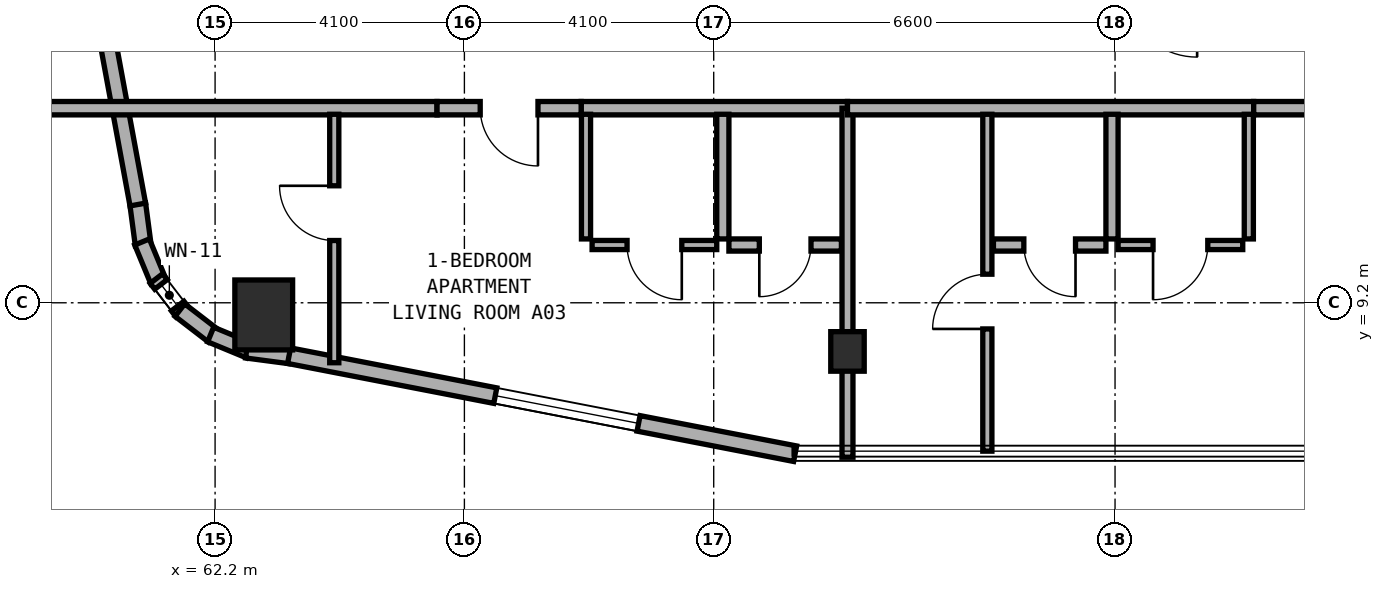
"""IFC4 building model, lengths in metres.
Left out: names, types, materials, properties, quantities, classifications, styles, units other than length and angle.
Written with IfcOpenShell. Run it as: python <this file> out.ifc"""

import sys

from ifc_helpers import new_model, si_unit, direction, frame, frame_2d, origin, origin_2d, place, context, subcontext, project, spatial, rectangle, extrude, element, fill, save


model = new_model("IFC4")
c1 = context("Model", 3, precision=1e-05, world=origin(), true_north=direction((0.0, 1.0)))
c2 = subcontext(c1, "Body", "Model", "MODEL_VIEW")
j1 = project(units=[si_unit("LENGTHUNIT", "METRE"), si_unit("PLANEANGLEUNIT", "RADIAN")], contexts=[c1])
p1 = place(None, origin())
s1 = spatial("IfcSite", under=j1, at=p1, CompositionType="ELEMENT")
p2 = place(p1, origin())
s2 = spatial("IfcBuilding", under=s1, at=p2, CompositionType="ELEMENT")
p3 = place(p2, frame((0.0, 0.0, 116.0)))
s3 = spatial("IfcBuildingStorey", under=s2, at=p3, CompositionType="ELEMENT", Elevation=116.0)
p4 = place(p3, frame((72.6, 8.4, 0.0), z_axis=(0.0, 0.0, 1.0), x_axis=(1.0, 0.0, 0.0)))
e1 = element("IfcColumn", 1, at=p4, inside=s3, PredefinedType="COLUMN", context=c2, shape_type="SweptSolid", body=[
    extrude(rectangle(XDim=0.55, YDim=0.65, at=origin_2d()), origin(), (0.0, 0.0, 1.0), 3.5),
])
p5 = place(p3, frame((63.0, 9.0, 0.0), z_axis=(0.0, 0.0, 1.0), x_axis=(1.0, 0.0, 0.0)))
e2 = element("IfcColumn", 2, at=p5, inside=s3, PredefinedType="COLUMN", context=c2, shape_type="SweptSolid", body=[
    extrude(rectangle(XDim=0.95, YDim=1.15, at=origin_2d()), origin(), (0.0, 0.0, 1.0), 3.5),
])
p6 = place(p3, frame((60.928, 10.825, 0.0), z_axis=(0.0, 0.0, 1.0), x_axis=(0.131667498923, -0.991293937098, 0.0)))
e3 = element("IfcWall", 3, at=p6, inside=s3, PredefinedType="STANDARD", context=c2, shape_type="SweptSolid", body=[
    extrude(rectangle(XDim=0.677, YDim=0.26, at=frame_2d((0.338, 0.0))), origin(), (0.0, 0.0, 1.0), 3.18),
])
p7 = place(p3, frame((60.999, 10.2, 0.0), z_axis=(0.0, 0.0, 1.0), x_axis=(0.381988976935, -0.924166879681, 0.0)))
e4 = element("IfcWall", 4, at=p7, inside=s3, PredefinedType="STANDARD", context=c2, shape_type="SweptSolid", body=[
    extrude(rectangle(XDim=0.693, YDim=0.26, at=frame_2d((0.347, 0.0))), origin(), (0.0, 0.0, 1.0), 3.18),
])
p8 = place(p3, frame((61.236, 9.599, 0.0), z_axis=(0.0, 0.0, 1.0), x_axis=(0.609472651958, -0.792807092876, 0.0)))
e5 = element("IfcWall", 5, at=p8, inside=s3, PredefinedType="STANDARD", context=c2, shape_type="SweptSolid", body=[
    extrude(rectangle(XDim=0.694, YDim=0.26, at=frame_2d((0.347, 0.0))), origin(), (0.0, 0.0, 1.0), 3.18),
])
p9 = place(p8, frame((0.122, 0.0, 0.85)))
e6 = element("IfcOpeningElement", 6, at=p9, cuts=e5, PredefinedType="OPENING", context=c2, shape_type="SweptSolid", body=[
    extrude(rectangle(XDim=0.45, YDim=1.5, at=frame_2d((0.225, 0.75))), frame((0.0, 0.14, 0.0), z_axis=(0.0, -1.0, 0.0), x_axis=(1.0, 0.0, 0.0)), (0.0, 0.0, 1.0), 0.28),
])
p10 = place(p3, frame((61.621, 9.08, 0.0), z_axis=(0.0, 0.0, 1.0), x_axis=(0.792506234191, -0.609863811657, 0.0)))
e7 = element("IfcWall", 7, at=p10, inside=s3, PredefinedType="STANDARD", context=c2, shape_type="SweptSolid", body=[
    extrude(rectangle(XDim=0.694, YDim=0.26, at=frame_2d((0.347, 0.0))), origin(), (0.0, 0.0, 1.0), 3.18),
])
p11 = place(p3, frame((62.127, 8.678, 0.0), z_axis=(0.0, 0.0, 1.0), x_axis=(0.92421822618, -0.381864727877, 0.0)))
e8 = element("IfcWall", 8, at=p11, inside=s3, PredefinedType="STANDARD", context=c2, shape_type="SweptSolid", body=[
    extrude(rectangle(XDim=0.694, YDim=0.26, at=frame_2d((0.347, 0.0))), origin(), (0.0, 0.0, 1.0), 3.18),
])
p12 = place(p3, frame((62.719, 8.421, 0.0), z_axis=(0.0, 0.0, 1.0), x_axis=(0.991433279471, -0.130614135366, 0.0)))
e9 = element("IfcWall", 9, at=p12, inside=s3, PredefinedType="STANDARD", context=c2, shape_type="SweptSolid", body=[
    extrude(rectangle(XDim=0.712, YDim=0.26, at=frame_2d((0.356, 0.0))), origin(), (0.0, 0.0, 1.0), 3.18),
])
p13 = place(p3, frame((63.417, 8.33, 0.0), z_axis=(0.0, 0.0, 1.0), x_axis=(0.981750199588, -0.190175039396, 0.0)))
e10 = element("IfcWall", 10, at=p13, inside=s3, PredefinedType="STANDARD", context=c2, shape_type="SweptSolid", body=[
    extrude(rectangle(XDim=8.477, YDim=0.26, at=frame_2d((4.238, 0.0))), origin(), (0.0, 0.0, 1.0), 3.18),
])
p14 = place(p13, frame((3.454, 0.0, 0.8)))
e11 = element("IfcOpeningElement", 11, at=p14, cuts=e10, PredefinedType="OPENING", context=c2, shape_type="SweptSolid", body=[
    extrude(rectangle(XDim=2.4, YDim=1.6, at=frame_2d((1.2, 0.8))), frame((0.0, 0.14, 0.0), z_axis=(0.0, -1.0, 0.0), x_axis=(1.0, 0.0, 0.0)), (0.0, 0.0, 1.0), 0.28),
])
p15 = place(p3, frame((59.318, 19.558, 0.0), z_axis=(0.0, 0.0, 1.0), x_axis=(0.181209963057, -0.983444431215, 0.0)))
e12 = element("IfcWall", 12, at=p15, inside=s3, PredefinedType="STANDARD", context=c2, shape_type="SweptSolid", body=[
    extrude(rectangle(XDim=8.889, YDim=0.26, at=frame_2d((4.445, 0.0))), origin(), (0.0, 0.0, 1.0), 3.18),
])
p16 = place(p15, frame((1.444, 0.0, 0.8)))
e13 = element("IfcOpeningElement", 13, at=p16, cuts=e12, PredefinedType="OPENING", context=c2, shape_type="SweptSolid", body=[
    extrude(rectangle(XDim=2.4, YDim=1.6, at=frame_2d((1.2, 0.8))), frame((0.0, 0.14, 0.0), z_axis=(0.0, -1.0, 0.0), x_axis=(1.0, 0.0, 0.0)), (0.0, 0.0, 1.0), 0.28),
])
p17 = place(p3, frame((59.36, 12.4, 0.0), z_axis=(0.0, 0.0, 1.0), x_axis=(1.0, 0.0, 0.0)))
e14 = element("IfcWall", 14, at=p17, inside=s3, PredefinedType="SOLIDWALL", context=c2, shape_type="SweptSolid", body=[
    extrude(rectangle(XDim=6.49, YDim=0.22, at=frame_2d((3.245, 0.0))), origin(), (0.0, 0.0, 1.0), 2.875),
])
p18 = place(p3, frame((68.22, 12.4, 0.0), z_axis=(0.0, 0.0, 1.0), x_axis=(1.0, 0.0, 0.0)))
e15 = element("IfcWall", 15, at=p18, inside=s3, PredefinedType="SOLIDWALL", context=c2, shape_type="SweptSolid", body=[
    extrude(rectangle(XDim=4.38, YDim=0.22, at=frame_2d((2.19, 0.0))), origin(), (0.0, 0.0, 1.0), 2.755),
])
p19 = place(p3, frame((65.85, 12.4, 0.0), z_axis=(0.0, 0.0, 1.0), x_axis=(1.0, 0.0, 0.0)))
e16 = element("IfcWall", 16, at=p19, inside=s3, PredefinedType="SOLIDWALL", context=c2, shape_type="SweptSolid", body=[
    extrude(rectangle(XDim=2.37, YDim=0.22, at=frame_2d((1.185, 0.0))), origin(), (0.0, 0.0, 1.0), 3.18),
])
p20 = place(p19, frame((0.71, 0.0, 0.0)))
e17 = element("IfcOpeningElement", 17, at=p20, cuts=e16, PredefinedType="OPENING", context=c2, shape_type="SweptSolid", body=[
    extrude(rectangle(XDim=0.95, YDim=2.1, at=frame_2d((0.475, 1.05))), frame((0.0, 0.12, 0.0), z_axis=(0.0, -1.0, 0.0), x_axis=(1.0, 0.0, 0.0)), (0.0, 0.0, 1.0), 0.24),
])
p21 = place(p3, frame((64.16, 8.214, 0.0), z_axis=(0.0, 0.0, 1.0), x_axis=(0.0, 1.0, 0.0)))
e18 = element("IfcWall", 18, at=p21, inside=s3, PredefinedType="PARTITIONING", context=c2, shape_type="SweptSolid", body=[
    extrude(rectangle(XDim=4.086, YDim=0.15, at=frame_2d((2.043, 0.0))), origin(), (0.0, 0.0, 1.0), 2.875),
])
p22 = place(p21, frame((2.01, 0.0, 0.0)))
e19 = element("IfcOpeningElement", 19, at=p22, cuts=e18, PredefinedType="OPENING", context=c2, shape_type="SweptSolid", body=[
    extrude(rectangle(XDim=0.9, YDim=2.1, at=frame_2d((0.45, 1.05))), frame((0.0, 0.085, 0.0), z_axis=(0.0, -1.0, 0.0), x_axis=(1.0, 0.0, 0.0)), (0.0, 0.0, 1.0), 0.17),
])
p23 = place(p3, frame((70.55, 10.25, 0.0), z_axis=(0.0, 0.0, 1.0), x_axis=(0.0, 1.0, 0.0)))
e20 = element("IfcWall", 20, at=p23, inside=s3, PredefinedType="PLUMBINGWALL", context=c2, shape_type="SweptSolid", body=[
    extrude(rectangle(XDim=2.05, YDim=0.2, at=frame_2d((1.025, 0.0))), origin(), (0.0, 0.0, 1.0), 3.18),
])
p24 = place(p3, frame((68.3, 10.25, 0.0), z_axis=(0.0, 0.0, 1.0), x_axis=(0.0, 1.0, 0.0)))
e21 = element("IfcWall", 21, at=p24, inside=s3, PredefinedType="PARTITIONING", context=c2, shape_type="SweptSolid", body=[
    extrude(rectangle(XDim=2.05, YDim=0.15, at=frame_2d((1.025, 0.0))), origin(), (0.0, 0.0, 1.0), 3.18),
])
p25 = place(p3, frame((70.65, 10.15, 0.0), z_axis=(0.0, 0.0, 1.0), x_axis=(1.0, 0.0, 0.0)))
e22 = element("IfcWall", 22, at=p25, inside=s3, PredefinedType="PLUMBINGWALL", context=c2, shape_type="SweptSolid", body=[
    extrude(rectangle(XDim=1.85, YDim=0.2, at=frame_2d((0.925, 0.0))), origin(), (0.0, 0.0, 1.0), 3.18),
])
p26 = place(p25, frame((0.5, 0.0, 0.0)))
e23 = element("IfcOpeningElement", 23, at=p26, cuts=e22, PredefinedType="OPENING", context=c2, shape_type="SweptSolid", body=[
    extrude(rectangle(XDim=0.85, YDim=2.1, at=frame_2d((0.425, 1.05))), frame((0.0, 0.11, 0.0), z_axis=(0.0, -1.0, 0.0), x_axis=(1.0, 0.0, 0.0)), (0.0, 0.0, 1.0), 0.22),
])
p27 = place(p3, frame((68.4, 10.15, 0.0), z_axis=(0.0, 0.0, 1.0), x_axis=(1.0, 0.0, 0.0)))
e24 = element("IfcWall", 24, at=p27, inside=s3, PredefinedType="PARTITIONING", context=c2, shape_type="SweptSolid", body=[
    extrude(rectangle(XDim=2.05, YDim=0.15, at=frame_2d((1.025, 0.0))), origin(), (0.0, 0.0, 1.0), 3.18),
])
p28 = place(p27, frame((0.575, 0.0, 0.0)))
e25 = element("IfcOpeningElement", 25, at=p28, cuts=e24, PredefinedType="OPENING", context=c2, shape_type="SweptSolid", body=[
    extrude(rectangle(XDim=0.9, YDim=2.1, at=frame_2d((0.45, 1.05))), frame((0.0, 0.085, 0.0), z_axis=(0.0, -1.0, 0.0), x_axis=(1.0, 0.0, 0.0)), (0.0, 0.0, 1.0), 0.17),
])
p29 = place(p3, frame((72.6, 6.66, 0.0), z_axis=(0.0, 0.0, 1.0), x_axis=(0.0, 1.0, 0.0)))
e26 = element("IfcWall", 26, at=p29, inside=s3, PredefinedType="SOLIDWALL", context=c2, shape_type="SweptSolid", body=[
    extrude(rectangle(XDim=5.74, YDim=0.18, at=frame_2d((2.87, 0.0))), origin(), (0.0, 0.0, 1.0), 2.755),
])
p30 = place(p3, frame((72.6, 12.4, 0.0), z_axis=(0.0, 0.0, 1.0), x_axis=(1.0, 0.0, 0.0)))
e27 = element("IfcWall", 27, at=p30, inside=s3, PredefinedType="SOLIDWALL", context=c2, shape_type="SweptSolid", body=[
    extrude(rectangle(XDim=6.68, YDim=0.22, at=frame_2d((3.34, 0.0))), origin(), (0.0, 0.0, 1.0), 2.755),
])
p31 = place(p3, frame((79.28, 12.4, 0.0), z_axis=(0.0, 0.0, 1.0), x_axis=(1.0, 0.0, 0.0)))
e28 = element("IfcWall", 28, at=p31, inside=s3, PredefinedType="SOLIDWALL", context=c2, shape_type="SweptSolid", body=[
    extrude(rectangle(XDim=9.07, YDim=0.22, at=frame_2d((4.535, 0.0))), origin(), (0.0, 0.0, 1.0), 2.755),
])
p32 = place(p31, frame((4.06, 0.0, 0.0)))
e29 = element("IfcOpeningElement", 29, at=p32, cuts=e28, PredefinedType="OPENING", context=c2, shape_type="SweptSolid", body=[
    extrude(rectangle(XDim=0.95, YDim=2.1, at=frame_2d((0.475, 1.05))), frame((0.0, 0.12, 0.0), z_axis=(0.0, -1.0, 0.0), x_axis=(1.0, 0.0, 0.0)), (0.0, 0.0, 1.0), 0.24),
])
p33 = place(p3, frame((74.9, 6.76, 0.0), z_axis=(0.0, 0.0, 1.0), x_axis=(0.0, 1.0, 0.0)))
e30 = element("IfcWall", 30, at=p33, inside=s3, PredefinedType="PARTITIONING", context=c2, shape_type="SweptSolid", body=[
    extrude(rectangle(XDim=5.54, YDim=0.15, at=frame_2d((2.77, 0.0))), origin(), (0.0, 0.0, 1.0), 2.855),
])
p34 = place(p33, frame((2.01, 0.0, 0.0)))
e31 = element("IfcOpeningElement", 31, at=p34, cuts=e30, PredefinedType="OPENING", context=c2, shape_type="SweptSolid", body=[
    extrude(rectangle(XDim=0.9, YDim=2.1, at=frame_2d((0.45, 1.05))), frame((0.0, 0.085, 0.0), z_axis=(0.0, -1.0, 0.0), x_axis=(1.0, 0.0, 0.0)), (0.0, 0.0, 1.0), 0.17),
])
p35 = place(p3, frame((76.95, 10.25, 0.0), z_axis=(0.0, 0.0, 1.0), x_axis=(0.0, 1.0, 0.0)))
e32 = element("IfcWall", 32, at=p35, inside=s3, PredefinedType="PLUMBINGWALL", context=c2, shape_type="SweptSolid", body=[
    extrude(rectangle(XDim=2.05, YDim=0.2, at=frame_2d((1.025, 0.0))), origin(), (0.0, 0.0, 1.0), 2.855),
])
p36 = place(p3, frame((79.2, 10.25, 0.0), z_axis=(0.0, 0.0, 1.0), x_axis=(0.0, 1.0, 0.0)))
e33 = element("IfcWall", 33, at=p36, inside=s3, PredefinedType="PARTITIONING", context=c2, shape_type="SweptSolid", body=[
    extrude(rectangle(XDim=2.05, YDim=0.15, at=frame_2d((1.025, 0.0))), origin(), (0.0, 0.0, 1.0), 2.855),
])
p37 = place(p3, frame((75.0, 10.15, 0.0), z_axis=(0.0, 0.0, 1.0), x_axis=(1.0, 0.0, 0.0)))
e34 = element("IfcWall", 34, at=p37, inside=s3, PredefinedType="PLUMBINGWALL", context=c2, shape_type="SweptSolid", body=[
    extrude(rectangle(XDim=1.85, YDim=0.2, at=frame_2d((0.925, 0.0))), origin(), (0.0, 0.0, 1.0), 3.18),
])
p38 = place(p37, frame((0.5, 0.0, 0.0)))
e35 = element("IfcOpeningElement", 35, at=p38, cuts=e34, PredefinedType="OPENING", context=c2, shape_type="SweptSolid", body=[
    extrude(rectangle(XDim=0.85, YDim=2.1, at=frame_2d((0.425, 1.05))), frame((0.0, 0.11, 0.0), z_axis=(0.0, -1.0, 0.0), x_axis=(1.0, 0.0, 0.0)), (0.0, 0.0, 1.0), 0.22),
])
p39 = place(p3, frame((77.05, 10.15, 0.0), z_axis=(0.0, 0.0, 1.0), x_axis=(1.0, 0.0, 0.0)))
e36 = element("IfcWall", 36, at=p39, inside=s3, PredefinedType="PARTITIONING", context=c2, shape_type="SweptSolid", body=[
    extrude(rectangle(XDim=2.05, YDim=0.15, at=frame_2d((1.025, 0.0))), origin(), (0.0, 0.0, 1.0), 3.18),
])
p40 = place(p39, frame((0.575, 0.0, 0.0)))
e37 = element("IfcOpeningElement", 37, at=p40, cuts=e36, PredefinedType="OPENING", context=c2, shape_type="SweptSolid", body=[
    extrude(rectangle(XDim=0.9, YDim=2.1, at=frame_2d((0.45, 1.05))), frame((0.0, 0.085, 0.0), z_axis=(0.0, -1.0, 0.0), x_axis=(1.0, 0.0, 0.0)), (0.0, 0.0, 1.0), 0.17),
])
p41 = place(p14, origin())
e38 = element("IfcWindow", 38, at=p41, inside=s3, PartitioningType="SINGLE_PANEL", PredefinedType="WINDOW", context=c2, shape_type="SweptSolid", body=[
    extrude(rectangle(XDim=2.4, YDim=1.6, at=frame_2d((1.2, 0.8))), frame((0.0, 0.03, 0.0), z_axis=(0.0, -1.0, 0.0), x_axis=(1.0, 0.0, 0.0)), (0.0, 0.0, 1.0), 0.06),
])
fill(e11, e38)
p42 = place(p9, origin())
e39 = element("IfcWindow", 39, at=p42, inside=s3, PartitioningType="SINGLE_PANEL", PredefinedType="WINDOW", context=c2, shape_type="SweptSolid", body=[
    extrude(rectangle(XDim=0.45, YDim=1.5, at=frame_2d((0.225, 0.75))), frame((0.0, 0.03, 0.0), z_axis=(0.0, -1.0, 0.0), x_axis=(1.0, 0.0, 0.0)), (0.0, 0.0, 1.0), 0.06),
])
fill(e6, e39)
p43 = place(p20, frame((0.95, 0.0, 0.0), z_axis=(0.0, 0.0, 1.0), x_axis=(-1.0, 0.0, 0.0)))
e40 = element("IfcDoor", 40, at=p43, inside=s3, OperationType="SINGLE_SWING_LEFT", PredefinedType="DOOR", context=c2, shape_type="SweptSolid", body=[
    extrude(rectangle(XDim=0.95, YDim=2.1, at=frame_2d((0.475, 1.05))), frame((0.0, 0.025, 0.0), z_axis=(0.0, -1.0, 0.0), x_axis=(1.0, 0.0, 0.0)), (0.0, 0.0, 1.0), 0.05),
])
fill(e17, e40)
p44 = place(p22, origin())
e41 = element("IfcDoor", 41, at=p44, inside=s3, OperationType="SINGLE_SWING_RIGHT", PredefinedType="DOOR", context=c2, shape_type="SweptSolid", body=[
    extrude(rectangle(XDim=0.9, YDim=2.1, at=frame_2d((0.45, 1.05))), frame((0.0, 0.025, 0.0), z_axis=(0.0, -1.0, 0.0), x_axis=(1.0, 0.0, 0.0)), (0.0, 0.0, 1.0), 0.05),
])
fill(e19, e41)
p45 = place(p26, frame((0.85, 0.0, 0.0), z_axis=(0.0, 0.0, 1.0), x_axis=(-1.0, 0.0, 0.0)))
e42 = element("IfcDoor", 42, at=p45, inside=s3, OperationType="SINGLE_SWING_RIGHT", PredefinedType="DOOR", context=c2, shape_type="SweptSolid", body=[
    extrude(rectangle(XDim=0.85, YDim=2.1, at=frame_2d((0.425, 1.05))), frame((0.0, 0.025, 0.0), z_axis=(0.0, -1.0, 0.0), x_axis=(1.0, 0.0, 0.0)), (0.0, 0.0, 1.0), 0.05),
])
fill(e23, e42)
p46 = place(p28, frame((0.9, 0.0, 0.0), z_axis=(0.0, 0.0, 1.0), x_axis=(-1.0, 0.0, 0.0)))
e43 = element("IfcDoor", 43, at=p46, inside=s3, OperationType="SINGLE_SWING_LEFT", PredefinedType="DOOR", context=c2, shape_type="SweptSolid", body=[
    extrude(rectangle(XDim=0.9, YDim=2.1, at=frame_2d((0.45, 1.05))), frame((0.0, 0.025, 0.0), z_axis=(0.0, -1.0, 0.0), x_axis=(1.0, 0.0, 0.0)), (0.0, 0.0, 1.0), 0.05),
])
fill(e25, e43)
p47 = place(p34, origin())
e44 = element("IfcDoor", 44, at=p47, inside=s3, OperationType="SINGLE_SWING_LEFT", PredefinedType="DOOR", context=c2, shape_type="SweptSolid", body=[
    extrude(rectangle(XDim=0.9, YDim=2.1, at=frame_2d((0.45, 1.05))), frame((0.0, 0.025, 0.0), z_axis=(0.0, -1.0, 0.0), x_axis=(1.0, 0.0, 0.0)), (0.0, 0.0, 1.0), 0.05),
])
fill(e31, e44)
p48 = place(p38, frame((0.85, 0.0, 0.0), z_axis=(0.0, 0.0, 1.0), x_axis=(-1.0, 0.0, 0.0)))
e45 = element("IfcDoor", 45, at=p48, inside=s3, OperationType="SINGLE_SWING_LEFT", PredefinedType="DOOR", context=c2, shape_type="SweptSolid", body=[
    extrude(rectangle(XDim=0.85, YDim=2.1, at=frame_2d((0.425, 1.05))), frame((0.0, 0.025, 0.0), z_axis=(0.0, -1.0, 0.0), x_axis=(1.0, 0.0, 0.0)), (0.0, 0.0, 1.0), 0.05),
])
fill(e35, e45)
p49 = place(p40, frame((0.9, 0.0, 0.0), z_axis=(0.0, 0.0, 1.0), x_axis=(-1.0, 0.0, 0.0)))
e46 = element("IfcDoor", 46, at=p49, inside=s3, OperationType="SINGLE_SWING_RIGHT", PredefinedType="DOOR", context=c2, shape_type="SweptSolid", body=[
    extrude(rectangle(XDim=0.9, YDim=2.1, at=frame_2d((0.45, 1.05))), frame((0.0, 0.025, 0.0), z_axis=(0.0, -1.0, 0.0), x_axis=(1.0, 0.0, 0.0)), (0.0, 0.0, 1.0), 0.05),
])
fill(e37, e46)
save(model, sys.argv[1])
